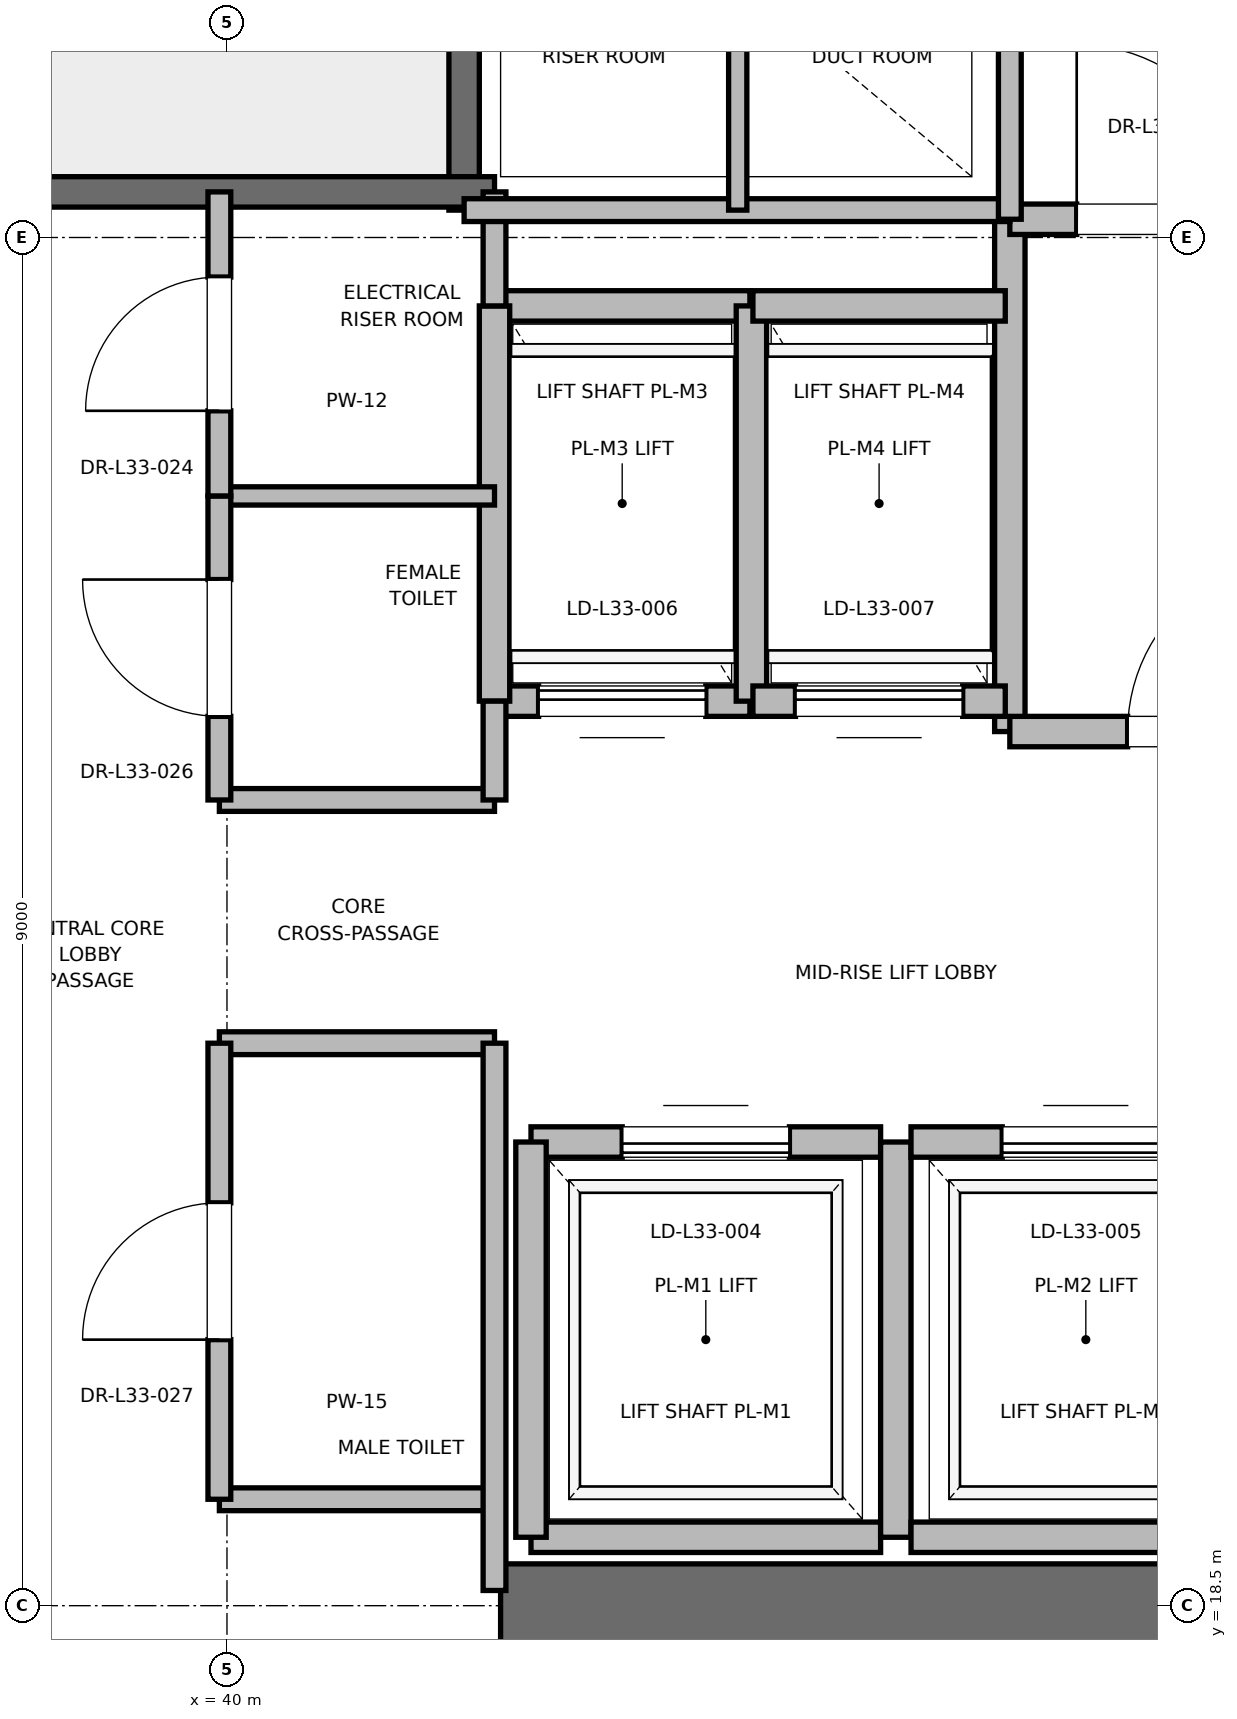
"""IFC4 building model, lengths in metres.
Left out: names, types, materials, properties, quantities, classifications, styles, units other than length and angle.
Written with IfcOpenShell. Run it as: python <this file> out.ifc"""

import sys

from ifc_helpers import new_model, si_unit, direction, frame, frame_2d, origin, place, context, subcontext, project, spatial, rectangle, extrude, element, fill, save


model = new_model("IFC4")
c1 = context("Model", 3, precision=1e-05, world=origin(), true_north=direction((0.0, 1.0)))
c2 = subcontext(c1, "Body", "Model", "MODEL_VIEW")
j1 = project(units=[si_unit("LENGTHUNIT", "METRE"), si_unit("PLANEANGLEUNIT", "RADIAN")], contexts=[c1])
p1 = place(None, origin())
s1 = spatial("IfcSite", under=j1, at=p1, CompositionType="ELEMENT")
p2 = place(p1, origin())
s2 = spatial("IfcBuilding", under=s1, at=p2, CompositionType="ELEMENT")
p3 = place(p2, frame((0.0, 0.0, 144.4)))
s3 = spatial("IfcBuildingStorey", under=s2, at=p3, CompositionType="ELEMENT", Elevation=144.4)
p4 = place(p3, frame((41.8, 18.5, 0.0), z_axis=(0.0, 0.0, 1.0), x_axis=(1.0, 0.0, 0.0)))
e1 = element("IfcWall", 1, at=p4, inside=s3, PredefinedType="SHEAR", context=c2, shape_type="SweptSolid", body=[
    extrude(rectangle(XDim=9.2, YDim=0.55, at=frame_2d((4.6, 0.0))), origin(), (0.0, 0.0, 1.0), 3.775),
])
p5 = place(p3, frame((41.56, 27.68, 0.0), z_axis=(0.0, 0.0, 1.0), x_axis=(0.0, 1.0, 0.0)))
e2 = element("IfcWall", 2, at=p5, inside=s3, PredefinedType="SOLIDWALL", context=c2, shape_type="SweptSolid", body=[
    extrude(rectangle(XDim=8.57, YDim=0.2, at=frame_2d((4.285, 0.0))), origin(), (0.0, 0.0, 1.0), 3.775),
])
p6 = place(p3, frame((38.44, 27.8, 0.0), z_axis=(0.0, 0.0, 1.0), x_axis=(1.0, 0.0, 0.0)))
e3 = element("IfcWall", 3, at=p6, inside=s3, PredefinedType="SOLIDWALL", context=c2, shape_type="SweptSolid", body=[
    extrude(rectangle(XDim=3.32, YDim=0.2, at=frame_2d((1.66, 0.0))), origin(), (0.0, 0.0, 1.0), 3.775),
])
p7 = place(p3, frame((45.15, 24.25, 0.0), z_axis=(0.0, 0.0, 1.0), x_axis=(0.0, 1.0, 0.0)))
e4 = element("IfcWall", 4, at=p7, inside=s3, PredefinedType="PARTITIONING", context=c2, shape_type="SweptSolid", body=[
    extrude(rectangle(XDim=3.37, YDim=0.2, at=frame_2d((1.685, 0.0))), origin(), (0.0, 0.0, 1.0), 3.775),
])
p8 = place(p3, frame((45.15, 24.25, 0.0), z_axis=(0.0, 0.0, 1.0), x_axis=(1.0, 0.0, 0.0)))
e5 = element("IfcWall", 5, at=p8, inside=s3, PredefinedType="PARTITIONING", context=c2, shape_type="SweptSolid", body=[
    extrude(rectangle(XDim=2.7, YDim=0.2, at=frame_2d((1.35, 0.0))), origin(), (0.0, 0.0, 1.0), 3.775),
])
p9 = place(p8, frame((0.775, 0.0, 0.0)))
e6 = element("IfcOpeningElement", 6, at=p9, cuts=e5, PredefinedType="OPENING", context=c2, shape_type="SweptSolid", body=[
    extrude(rectangle(XDim=1.15, YDim=2.2, at=frame_2d((0.575, 1.1))), frame((0.0, 0.1, 0.0), z_axis=(0.0, -1.0, 0.0), x_axis=(1.0, 0.0, 0.0)), (0.0, 0.0, 1.0), 0.2),
])
p10 = place(p3, frame((45.15, 27.62, 0.0), z_axis=(0.0, 0.0, 1.0), x_axis=(1.0, 0.0, 0.0)))
e7 = element("IfcWall", 7, at=p10, inside=s3, PredefinedType="PARTITIONING", context=c2, shape_type="SweptSolid", body=[
    extrude(rectangle(XDim=2.03, YDim=0.2, at=frame_2d((1.015, 0.0))), origin(), (0.0, 0.0, 1.0), 3.775),
])
p11 = place(p10, frame((0.44, 0.0, 0.0)))
e8 = element("IfcOpeningElement", 8, at=p11, cuts=e7, PredefinedType="OPENING", context=c2, shape_type="SweptSolid", body=[
    extrude(rectangle(XDim=1.15, YDim=2.2, at=frame_2d((0.575, 1.1))), frame((0.0, 0.1, 0.0), z_axis=(0.0, -1.0, 0.0), x_axis=(1.0, 0.0, 0.0)), (0.0, 0.0, 1.0), 0.2),
])
p12 = place(p3, frame((42.0, 18.95, 0.0), z_axis=(0.0, 0.0, 1.0), x_axis=(1.0, 0.0, 0.0)))
e9 = element("IfcWall", 9, at=p12, inside=s3, PredefinedType="SOLIDWALL", context=c2, shape_type="SweptSolid", body=[
    extrude(rectangle(XDim=2.3, YDim=0.2, at=frame_2d((1.15, 0.0))), origin(), (0.0, 0.0, 1.0), 2.755),
])
p13 = place(p3, frame((44.3, 21.55, 0.0), z_axis=(0.0, 0.0, 1.0), x_axis=(-1.0, 0.0, 0.0)))
e10 = element("IfcWall", 10, at=p13, inside=s3, PredefinedType="SOLIDWALL", context=c2, shape_type="SweptSolid", body=[
    extrude(rectangle(XDim=2.3, YDim=0.2, at=frame_2d((1.15, 0.0))), origin(), (0.0, 0.0, 1.0), 3.775),
])
p14 = place(p13, frame((0.6, 0.0, 0.0)))
e11 = element("IfcOpeningElement", 11, at=p14, cuts=e10, PredefinedType="OPENING", context=c2, shape_type="SweptSolid", body=[
    extrude(rectangle(XDim=1.1, YDim=2.2, at=frame_2d((0.55, 1.1))), frame((0.0, 0.1, 0.0), z_axis=(0.0, -1.0, 0.0), x_axis=(1.0, 0.0, 0.0)), (0.0, 0.0, 1.0), 0.2),
])
p15 = place(p3, frame((42.0, 21.55, 0.0), z_axis=(0.0, 0.0, 1.0), x_axis=(0.0, -1.0, 0.0)))
e12 = element("IfcWall", 12, at=p15, inside=s3, PredefinedType="SOLIDWALL", context=c2, shape_type="SweptSolid", body=[
    extrude(rectangle(XDim=2.6, YDim=0.2, at=frame_2d((1.3, 0.0))), origin(), (0.0, 0.0, 1.0), 2.755),
])
p16 = place(p3, frame((44.4, 18.95, 0.0), z_axis=(0.0, 0.0, 1.0), x_axis=(0.0, 1.0, 0.0)))
e13 = element("IfcWall", 13, at=p16, inside=s3, PredefinedType="SOLIDWALL", context=c2, shape_type="SweptSolid", body=[
    extrude(rectangle(XDim=2.6, YDim=0.2, at=frame_2d((1.3, 0.0))), origin(), (0.0, 0.0, 1.0), 3.775),
])
p17 = place(p3, frame((44.5, 18.95, 0.0), z_axis=(0.0, 0.0, 1.0), x_axis=(1.0, 0.0, 0.0)))
e14 = element("IfcWall", 14, at=p17, inside=s3, PredefinedType="SOLIDWALL", context=c2, shape_type="SweptSolid", body=[
    extrude(rectangle(XDim=2.3, YDim=0.2, at=frame_2d((1.15, 0.0))), origin(), (0.0, 0.0, 1.0), 3.775),
])
p18 = place(p3, frame((46.8, 21.55, 0.0), z_axis=(0.0, 0.0, 1.0), x_axis=(-1.0, 0.0, 0.0)))
e15 = element("IfcWall", 15, at=p18, inside=s3, PredefinedType="SOLIDWALL", context=c2, shape_type="SweptSolid", body=[
    extrude(rectangle(XDim=2.3, YDim=0.2, at=frame_2d((1.15, 0.0))), origin(), (0.0, 0.0, 1.0), 3.775),
])
p19 = place(p18, frame((0.6, 0.0, 0.0)))
e16 = element("IfcOpeningElement", 16, at=p19, cuts=e15, PredefinedType="OPENING", context=c2, shape_type="SweptSolid", body=[
    extrude(rectangle(XDim=1.1, YDim=2.2, at=frame_2d((0.55, 1.1))), frame((0.0, 0.1, 0.0), z_axis=(0.0, -1.0, 0.0), x_axis=(1.0, 0.0, 0.0)), (0.0, 0.0, 1.0), 0.2),
])
p20 = place(p3, frame((41.76, 24.45, 0.0), z_axis=(0.0, 0.0, 1.0), x_axis=(1.0, 0.0, 0.0)))
e17 = element("IfcWall", 17, at=p20, inside=s3, PredefinedType="SOLIDWALL", context=c2, shape_type="SweptSolid", body=[
    extrude(rectangle(XDim=1.68, YDim=0.2, at=frame_2d((0.84, 0.0))), origin(), (0.0, 0.0, 1.0), 3.775),
])
p21 = place(p20, frame((0.29, 0.0, 0.0)))
e18 = element("IfcOpeningElement", 18, at=p21, cuts=e17, PredefinedType="OPENING", context=c2, shape_type="SweptSolid", body=[
    extrude(rectangle(XDim=1.1, YDim=2.2, at=frame_2d((0.55, 1.1))), frame((0.0, 0.1, 0.0), z_axis=(0.0, -1.0, 0.0), x_axis=(1.0, 0.0, 0.0)), (0.0, 0.0, 1.0), 0.2),
])
p22 = place(p3, frame((43.44, 27.05, 0.0), z_axis=(0.0, 0.0, 1.0), x_axis=(-1.0, 0.0, 0.0)))
e19 = element("IfcWall", 19, at=p22, inside=s3, PredefinedType="SOLIDWALL", context=c2, shape_type="SweptSolid", body=[
    extrude(rectangle(XDim=1.68, YDim=0.2, at=frame_2d((0.84, 0.0))), origin(), (0.0, 0.0, 1.0), 3.775),
])
for number, where, z_axis, x_axis in (
    (20, (41.76, 27.05, 0.0), (0.0, 0.0, 1.0), (0.0, -1.0, 0.0)),
    (21, (43.45, 24.45, 0.0), (0.0, 0.0, 1.0), (0.0, 1.0, 0.0)),
):
    element("IfcWall", number, at=place(p3, frame(where, z_axis=z_axis, x_axis=x_axis)), inside=s3, PredefinedType="SOLIDWALL", context=c2, shape_type="SweptSolid", body=[
        extrude(rectangle(XDim=2.6, YDim=0.2, at=frame_2d((1.3, 0.0))), origin(), (0.0, 0.0, 1.0), 3.775),
    ])
p23 = place(p3, frame((43.46, 24.45, 0.0), z_axis=(0.0, 0.0, 1.0), x_axis=(1.0, 0.0, 0.0)))
e22 = element("IfcWall", 22, at=p23, inside=s3, PredefinedType="SOLIDWALL", context=c2, shape_type="SweptSolid", body=[
    extrude(rectangle(XDim=1.66, YDim=0.2, at=frame_2d((0.83, 0.0))), origin(), (0.0, 0.0, 1.0), 3.775),
])
p24 = place(p23, frame((0.28, 0.0, 0.0)))
e23 = element("IfcOpeningElement", 23, at=p24, cuts=e22, PredefinedType="OPENING", context=c2, shape_type="SweptSolid", body=[
    extrude(rectangle(XDim=1.1, YDim=2.2, at=frame_2d((0.55, 1.1))), frame((0.0, 0.1, 0.0), z_axis=(0.0, -1.0, 0.0), x_axis=(1.0, 0.0, 0.0)), (0.0, 0.0, 1.0), 0.2),
])
p25 = place(p3, frame((45.12, 27.05, 0.0), z_axis=(0.0, 0.0, 1.0), x_axis=(-1.0, 0.0, 0.0)))
e24 = element("IfcWall", 24, at=p25, inside=s3, PredefinedType="SOLIDWALL", context=c2, shape_type="SweptSolid", body=[
    extrude(rectangle(XDim=1.66, YDim=0.2, at=frame_2d((0.83, 0.0))), origin(), (0.0, 0.0, 1.0), 3.775),
])
for number, where, z_axis, x_axis in (
    (25, (39.95, 19.2, 0.0), (0.0, 0.0, 1.0), (1.0, 0.0, 0.0)),
    (26, (39.95, 22.2, 0.0), (0.0, 0.0, 1.0), (1.0, 0.0, 0.0)),
    (27, (39.95, 23.8, 0.0), (0.0, 0.0, 1.0), (1.0, 0.0, 0.0)),
):
    element("IfcWall", number, at=place(p3, frame(where, z_axis=z_axis, x_axis=x_axis)), inside=s3, PredefinedType="PARTITIONING", context=c2, shape_type="SweptSolid", body=[
        extrude(rectangle(XDim=1.81, YDim=0.15, at=frame_2d((0.905, 0.0))), origin(), (0.0, 0.0, 1.0), 2.85),
    ])
p26 = place(p3, frame((39.95, 25.8, 0.0), z_axis=(0.0, 0.0, 1.0), x_axis=(1.0, 0.0, 0.0)))
e28 = element("IfcWall", 28, at=p26, inside=s3, PredefinedType="PARTITIONING", context=c2, shape_type="SweptSolid", body=[
    extrude(rectangle(XDim=1.81, YDim=0.12, at=frame_2d((0.905, 0.0))), origin(), (0.0, 0.0, 1.0), 2.85),
])
p27 = place(p3, frame((41.76, 18.6, 0.0), z_axis=(0.0, 0.0, 1.0), x_axis=(0.0, 1.0, 0.0)))
e29 = element("IfcWall", 29, at=p27, inside=s3, PredefinedType="PARTITIONING", context=c2, shape_type="SweptSolid", body=[
    extrude(rectangle(XDim=3.6, YDim=0.15, at=frame_2d((1.8, 0.0))), origin(), (0.0, 0.0, 1.0), 2.755),
])
p28 = place(p3, frame((41.76, 23.8, 0.0), z_axis=(0.0, 0.0, 1.0), x_axis=(0.0, 1.0, 0.0)))
e30 = element("IfcWall", 30, at=p28, inside=s3, PredefinedType="PARTITIONING", context=c2, shape_type="SweptSolid", body=[
    extrude(rectangle(XDim=0.65, YDim=0.15, at=frame_2d((0.325, 0.0))), origin(), (0.0, 0.0, 1.0), 2.85),
])
p29 = place(p3, frame((41.76, 27.05, 0.0), z_axis=(0.0, 0.0, 1.0), x_axis=(0.0, 1.0, 0.0)))
e31 = element("IfcWall", 31, at=p29, inside=s3, PredefinedType="PARTITIONING", context=c2, shape_type="SweptSolid", body=[
    extrude(rectangle(XDim=0.75, YDim=0.15, at=frame_2d((0.375, 0.0))), origin(), (0.0, 0.0, 1.0), 2.85),
])
p30 = place(p3, frame((39.95, 19.2, 0.0), z_axis=(0.0, 0.0, 1.0), x_axis=(0.0, 1.0, 0.0)))
e32 = element("IfcWall", 32, at=p30, inside=s3, PredefinedType="PARTITIONING", context=c2, shape_type="SweptSolid", body=[
    extrude(rectangle(XDim=3.0, YDim=0.15, at=frame_2d((1.5, 0.0))), origin(), (0.0, 0.0, 1.0), 2.85),
])
p31 = place(p30, frame((1.05, 0.0, 0.0)))
e33 = element("IfcOpeningElement", 33, at=p31, cuts=e32, PredefinedType="OPENING", context=c2, shape_type="SweptSolid", body=[
    extrude(rectangle(XDim=0.9, YDim=2.1, at=frame_2d((0.45, 1.05))), frame((0.0, 0.075, 0.0), z_axis=(0.0, -1.0, 0.0), x_axis=(1.0, 0.0, 0.0)), (0.0, 0.0, 1.0), 0.15),
])
p32 = place(p3, frame((39.95, 23.8, 0.0), z_axis=(0.0, 0.0, 1.0), x_axis=(0.0, 1.0, 0.0)))
e34 = element("IfcWall", 34, at=p32, inside=s3, PredefinedType="PARTITIONING", context=c2, shape_type="SweptSolid", body=[
    extrude(rectangle(XDim=2.0, YDim=0.15, at=frame_2d((1.0, 0.0))), origin(), (0.0, 0.0, 1.0), 2.85),
])
p33 = place(p32, frame((0.55, 0.0, 0.0)))
e35 = element("IfcOpeningElement", 35, at=p33, cuts=e34, PredefinedType="OPENING", context=c2, shape_type="SweptSolid", body=[
    extrude(rectangle(XDim=0.9, YDim=2.1, at=frame_2d((0.45, 1.05))), frame((0.0, 0.075, 0.0), z_axis=(0.0, -1.0, 0.0), x_axis=(1.0, 0.0, 0.0)), (0.0, 0.0, 1.0), 0.15),
])
p34 = place(p3, frame((39.95, 25.8, 0.0), z_axis=(0.0, 0.0, 1.0), x_axis=(0.0, 1.0, 0.0)))
e36 = element("IfcWall", 36, at=p34, inside=s3, PredefinedType="PARTITIONING", context=c2, shape_type="SweptSolid", body=[
    extrude(rectangle(XDim=2.0, YDim=0.15, at=frame_2d((1.0, 0.0))), origin(), (0.0, 0.0, 1.0), 2.85),
])
p35 = place(p34, frame((0.56, 0.0, 0.0)))
e37 = element("IfcOpeningElement", 37, at=p35, cuts=e36, PredefinedType="OPENING", context=c2, shape_type="SweptSolid", body=[
    extrude(rectangle(XDim=0.88, YDim=2.1, at=frame_2d((0.44, 1.05))), frame((0.0, 0.075, 0.0), z_axis=(0.0, -1.0, 0.0), x_axis=(1.0, 0.0, 0.0)), (0.0, 0.0, 1.0), 0.15),
])
p36 = place(p3, frame((41.56, 27.68, 0.0), z_axis=(0.0, 0.0, 1.0), x_axis=(1.0, 0.0, 0.0)))
e38 = element("IfcWall", 38, at=p36, inside=s3, PredefinedType="PARTITIONING", context=c2, shape_type="SweptSolid", body=[
    extrude(rectangle(XDim=3.59, YDim=0.15, at=frame_2d((1.795, 0.0))), origin(), (0.0, 0.0, 1.0), 2.85),
])
p37 = place(p3, frame((45.15, 27.62, 0.0), z_axis=(0.0, 0.0, 1.0), x_axis=(0.0, 1.0, 0.0)))
e39 = element("IfcWall", 39, at=p37, inside=s3, PredefinedType="PARTITIONING", context=c2, shape_type="SweptSolid", body=[
    extrude(rectangle(XDim=3.1, YDim=0.15, at=frame_2d((1.55, 0.0))), origin(), (0.0, 0.0, 1.0), 2.85),
])
p38 = place(p3, frame((43.36, 27.68, 0.0), z_axis=(0.0, 0.0, 1.0), x_axis=(0.0, 1.0, 0.0)))
e40 = element("IfcWall", 40, at=p38, inside=s3, PredefinedType="PARTITIONING", context=c2, shape_type="SweptSolid", body=[
    extrude(rectangle(XDim=3.04, YDim=0.12, at=frame_2d((1.52, 0.0))), origin(), (0.0, 0.0, 1.0), 2.85),
])
p39 = place(p9, origin())
e41 = element("IfcDoor", 41, at=p39, inside=s3, OperationType="SINGLE_SWING_RIGHT", PredefinedType="DOOR", context=c2, shape_type="SweptSolid", body=[
    extrude(rectangle(XDim=1.15, YDim=2.2, at=frame_2d((0.575, 1.1))), frame((0.0, 0.025, 0.0), z_axis=(0.0, -1.0, 0.0), x_axis=(1.0, 0.0, 0.0)), (0.0, 0.0, 1.0), 0.05),
])
fill(e6, e41)
p40 = place(p11, origin())
e42 = element("IfcDoor", 42, at=p40, inside=s3, OperationType="SINGLE_SWING_LEFT", PredefinedType="DOOR", context=c2, shape_type="SweptSolid", body=[
    extrude(rectangle(XDim=1.15, YDim=2.2, at=frame_2d((0.575, 1.1))), frame((0.0, 0.025, 0.0), z_axis=(0.0, -1.0, 0.0), x_axis=(1.0, 0.0, 0.0)), (0.0, 0.0, 1.0), 0.05),
])
fill(e8, e42)
p41 = place(p14, origin())
e43 = element("IfcDoor", 43, at=p41, inside=s3, OperationType="SLIDING_TO_RIGHT", PredefinedType="DOOR", context=c2, shape_type="SweptSolid", body=[
    extrude(rectangle(XDim=1.1, YDim=2.2, at=frame_2d((0.55, 1.1))), frame((0.0, 0.025, 0.0), z_axis=(0.0, -1.0, 0.0), x_axis=(1.0, 0.0, 0.0)), (0.0, 0.0, 1.0), 0.05),
])
fill(e11, e43)
p42 = place(p19, origin())
e44 = element("IfcDoor", 44, at=p42, inside=s3, OperationType="SLIDING_TO_RIGHT", PredefinedType="DOOR", context=c2, shape_type="SweptSolid", body=[
    extrude(rectangle(XDim=1.1, YDim=2.2, at=frame_2d((0.55, 1.1))), frame((0.0, 0.025, 0.0), z_axis=(0.0, -1.0, 0.0), x_axis=(1.0, 0.0, 0.0)), (0.0, 0.0, 1.0), 0.05),
])
fill(e16, e44)
p43 = place(p21, origin())
e45 = element("IfcDoor", 45, at=p43, inside=s3, OperationType="SLIDING_TO_RIGHT", PredefinedType="DOOR", context=c2, shape_type="SweptSolid", body=[
    extrude(rectangle(XDim=1.1, YDim=2.2, at=frame_2d((0.55, 1.1))), frame((0.0, 0.025, 0.0), z_axis=(0.0, -1.0, 0.0), x_axis=(1.0, 0.0, 0.0)), (0.0, 0.0, 1.0), 0.05),
])
fill(e18, e45)
p44 = place(p24, origin())
e46 = element("IfcDoor", 46, at=p44, inside=s3, OperationType="SLIDING_TO_RIGHT", PredefinedType="DOOR", context=c2, shape_type="SweptSolid", body=[
    extrude(rectangle(XDim=1.1, YDim=2.2, at=frame_2d((0.55, 1.1))), frame((0.0, 0.025, 0.0), z_axis=(0.0, -1.0, 0.0), x_axis=(1.0, 0.0, 0.0)), (0.0, 0.0, 1.0), 0.05),
])
fill(e23, e46)
p45 = place(p31, origin())
e47 = element("IfcDoor", 47, at=p45, inside=s3, OperationType="SINGLE_SWING_LEFT", PredefinedType="DOOR", context=c2, shape_type="SweptSolid", body=[
    extrude(rectangle(XDim=0.9, YDim=2.1, at=frame_2d((0.45, 1.05))), frame((0.0, 0.025, 0.0), z_axis=(0.0, -1.0, 0.0), x_axis=(1.0, 0.0, 0.0)), (0.0, 0.0, 1.0), 0.05),
])
fill(e33, e47)
p46 = place(p33, origin())
e48 = element("IfcDoor", 48, at=p46, inside=s3, OperationType="SINGLE_SWING_RIGHT", PredefinedType="DOOR", context=c2, shape_type="SweptSolid", body=[
    extrude(rectangle(XDim=0.9, YDim=2.1, at=frame_2d((0.45, 1.05))), frame((0.0, 0.025, 0.0), z_axis=(0.0, -1.0, 0.0), x_axis=(1.0, 0.0, 0.0)), (0.0, 0.0, 1.0), 0.05),
])
fill(e35, e48)
p47 = place(p35, origin())
e49 = element("IfcDoor", 49, at=p47, inside=s3, OperationType="SINGLE_SWING_LEFT", PredefinedType="DOOR", context=c2, shape_type="SweptSolid", body=[
    extrude(rectangle(XDim=0.88, YDim=2.1, at=frame_2d((0.44, 1.05))), frame((0.0, 0.025, 0.0), z_axis=(0.0, -1.0, 0.0), x_axis=(1.0, 0.0, 0.0)), (0.0, 0.0, 1.0), 0.05),
])
fill(e37, e49)
save(model, sys.argv[1])
